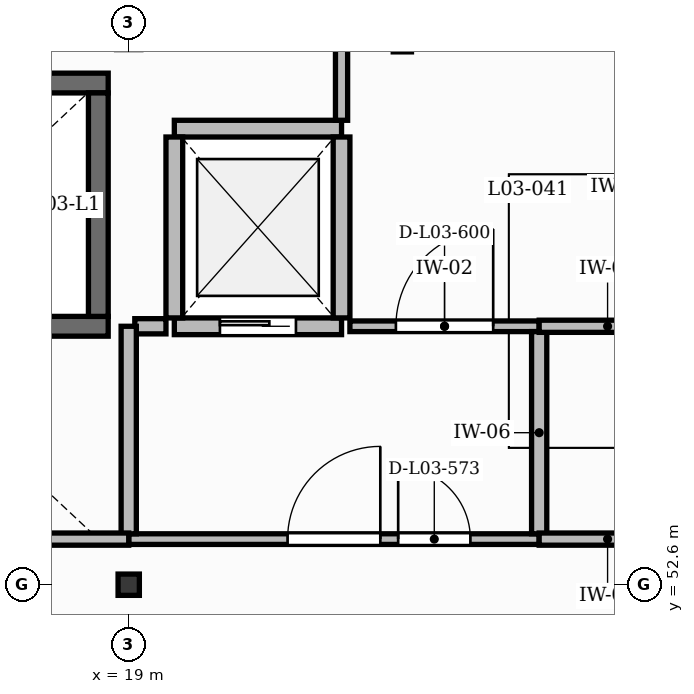
"""IFC4 building model, lengths in metres.
Left out: names, types, materials, properties, quantities, classifications, styles, units other than length and angle.
Written with IfcOpenShell. Run it as: python <this file> out.ifc"""

import sys

from ifc_helpers import new_model, si_unit, direction, frame, frame_2d, origin, origin_2d, place, context, subcontext, project, spatial, rectangle, extrude, element, fill, save


model = new_model("IFC4")
c1 = context("Model", 3, precision=1e-05, world=origin(), true_north=direction((0.0, 1.0)))
c2 = subcontext(c1, "Body", "Model", "MODEL_VIEW")
j1 = project(units=[si_unit("LENGTHUNIT", "METRE"), si_unit("PLANEANGLEUNIT", "RADIAN")], contexts=[c1])
p1 = place(None, origin())
s1 = spatial("IfcSite", under=j1, at=p1, CompositionType="ELEMENT")
p2 = place(p1, origin())
s2 = spatial("IfcBuilding", under=s1, at=p2, CompositionType="ELEMENT")
p3 = place(p2, frame((0.0, 0.0, 13.2)))
s3 = spatial("IfcBuildingStorey", under=s2, at=p3, CompositionType="ELEMENT", Elevation=13.2)
p4 = place(p3, frame((19.0, 52.6, 0.0), z_axis=(0.0, 0.0, 1.0), x_axis=(1.0, 0.0, 0.0)))
e1 = element("IfcColumn", 1, at=p4, inside=s3, PredefinedType="COLUMN", context=c2, shape_type="SweptSolid", body=[
    extrude(rectangle(XDim=0.28, YDim=0.28, at=origin_2d()), origin(), (0.0, 0.0, 1.0), 4.01),
])
for number, where, z_axis, x_axis in (
    (2, (12.07, 56.0, 0.0), (0.0, 0.0, 1.0), (1.0, 0.0, 0.0)),
    (3, (12.07, 59.2, 0.0), (0.0, 0.0, 1.0), (1.0, 0.0, 0.0)),
):
    element("IfcWall", number, at=place(p3, frame(where, z_axis=z_axis, x_axis=x_axis)), inside=s3, PredefinedType="SHEAR", context=c2, shape_type="SweptSolid", body=[
        extrude(rectangle(XDim=6.66, YDim=0.26, at=frame_2d((3.33, 0.0))), origin(), (0.0, 0.0, 1.0), 3.95),
    ])
p5 = place(p3, frame((18.6, 56.13, 0.0), z_axis=(0.0, 0.0, 1.0), x_axis=(0.0, 1.0, 0.0)))
e4 = element("IfcWall", 4, at=p5, inside=s3, PredefinedType="SHEAR", context=c2, shape_type="SweptSolid", body=[
    extrude(rectangle(XDim=2.94, YDim=0.26, at=frame_2d((1.47, 0.0))), origin(), (0.0, 0.0, 1.0), 3.95),
])
p6 = place(p3, frame((19.6, 56.0, 0.0), z_axis=(0.0, 0.0, 1.0), x_axis=(1.0, 0.0, 0.0)))
e5 = element("IfcWall", 5, at=p6, inside=s3, PredefinedType="SOLIDWALL", context=c2, shape_type="SweptSolid", body=[
    extrude(rectangle(XDim=2.2, YDim=0.22, at=frame_2d((1.1, 0.0))), origin(), (0.0, 0.0, 1.0), 3.95),
])
p7 = place(p6, frame((0.6, 0.0, 0.0)))
e6 = element("IfcOpeningElement", 6, at=p7, cuts=e5, PredefinedType="OPENING", context=c2, shape_type="SweptSolid", body=[
    extrude(rectangle(XDim=1.0, YDim=2.15, at=frame_2d((0.5, 1.075))), frame((0.0, 0.12, 0.0), z_axis=(0.0, -1.0, 0.0), x_axis=(1.0, 0.0, 0.0)), (0.0, 0.0, 1.0), 0.24),
])
p8 = place(p3, frame((19.6, 58.6, 0.0), z_axis=(0.0, 0.0, 1.0), x_axis=(1.0, 0.0, 0.0)))
e7 = element("IfcWall", 7, at=p8, inside=s3, PredefinedType="SOLIDWALL", context=c2, shape_type="SweptSolid", body=[
    extrude(rectangle(XDim=2.2, YDim=0.22, at=frame_2d((1.1, 0.0))), origin(), (0.0, 0.0, 1.0), 3.95),
])
for number, where, z_axis, x_axis in (
    (8, (19.6, 56.11, 0.0), (0.0, 0.0, 1.0), (0.0, 1.0, 0.0)),
    (9, (21.8, 56.11, 0.0), (0.0, 0.0, 1.0), (0.0, 1.0, 0.0)),
):
    element("IfcWall", number, at=place(p3, frame(where, z_axis=z_axis, x_axis=x_axis)), inside=s3, PredefinedType="SOLIDWALL", context=c2, shape_type="SweptSolid", body=[
        extrude(rectangle(XDim=2.38, YDim=0.22, at=frame_2d((1.19, 0.0))), origin(), (0.0, 0.0, 1.0), 3.95),
    ])
p9 = place(p3, frame((19.0, 53.2, 0.0), z_axis=(0.0, 0.0, 1.0), x_axis=(1.0, 0.0, 0.0)))
e10 = element("IfcWall", 10, at=p9, inside=s3, PredefinedType="PARTITIONING", context=c2, shape_type="SweptSolid", body=[
    extrude(rectangle(XDim=5.4, YDim=0.14, at=frame_2d((2.7, 0.0))), origin(), (0.0, 0.0, 1.0), 3.96),
])
p10 = place(p9, frame((2.09, 0.0, 0.0)))
e11 = element("IfcOpeningElement", 11, at=p10, cuts=e10, PredefinedType="OPENING", context=c2, shape_type="SweptSolid", body=[
    extrude(rectangle(XDim=1.22, YDim=2.1, at=frame_2d((0.61, 1.05))), frame((0.0, 0.08, 0.0), z_axis=(0.0, -1.0, 0.0), x_axis=(1.0, 0.0, 0.0)), (0.0, 0.0, 1.0), 0.16),
])
p11 = place(p9, frame((3.545, 0.0, 0.0)))
e12 = element("IfcOpeningElement", 12, at=p11, cuts=e10, PredefinedType="OPENING", context=c2, shape_type="SweptSolid", body=[
    extrude(rectangle(XDim=0.95, YDim=2.1, at=frame_2d((0.475, 1.05))), frame((0.0, 0.08, 0.0), z_axis=(0.0, -1.0, 0.0), x_axis=(1.0, 0.0, 0.0)), (0.0, 0.0, 1.0), 0.16),
])
p12 = place(p3, frame((21.91, 56.0, 0.0), z_axis=(0.0, 0.0, 1.0), x_axis=(1.0, 0.0, 0.0)))
e13 = element("IfcWall", 13, at=p12, inside=s3, PredefinedType="PARTITIONING", context=c2, shape_type="SweptSolid", body=[
    extrude(rectangle(XDim=2.49, YDim=0.14, at=frame_2d((1.245, 0.0))), origin(), (0.0, 0.0, 1.0), 3.96),
])
p13 = place(p12, frame((0.605, 0.0, 0.0)))
e14 = element("IfcOpeningElement", 14, at=p13, cuts=e13, PredefinedType="OPENING", context=c2, shape_type="SweptSolid", body=[
    extrude(rectangle(XDim=1.28, YDim=2.2, at=frame_2d((0.64, 1.1))), frame((0.0, 0.08, 0.0), z_axis=(0.0, -1.0, 0.0), x_axis=(1.0, 0.0, 0.0)), (0.0, 0.0, 1.0), 0.16),
])
p14 = place(p3, frame((24.4, 53.27, 0.0), z_axis=(0.0, 0.0, 1.0), x_axis=(0.0, 1.0, 0.0)))
e15 = element("IfcWall", 15, at=p14, inside=s3, PredefinedType="PARTITIONING", context=c2, shape_type="SweptSolid", body=[
    extrude(rectangle(XDim=2.66, YDim=0.2, at=frame_2d((1.33, 0.0))), origin(), (0.0, 0.0, 1.0), 3.96),
])
p15 = place(p3, frame((19.49, 56.0, 0.0), z_axis=(0.0, 0.0, 1.0), x_axis=(-1.0, 0.0, 0.0)))
e16 = element("IfcWall", 16, at=p15, inside=s3, PredefinedType="PARTITIONING", context=c2, shape_type="SweptSolid", body=[
    extrude(rectangle(XDim=0.41, YDim=0.2, at=frame_2d((0.205, 0.0))), origin(), (0.0, 0.0, 1.0), 3.96),
])
p16 = place(p3, frame((19.0, 53.27, 0.0), z_axis=(0.0, 0.0, 1.0), x_axis=(0.0, 1.0, 0.0)))
e17 = element("IfcWall", 17, at=p16, inside=s3, PredefinedType="PARTITIONING", context=c2, shape_type="SweptSolid", body=[
    extrude(rectangle(XDim=2.73, YDim=0.2, at=frame_2d((1.365, 0.0))), origin(), (0.0, 0.0, 1.0), 3.49),
])
p17 = place(p3, frame((26.2, 53.2, 0.0), z_axis=(0.0, 0.0, 1.0), x_axis=(-1.0, 0.0, 0.0)))
e18 = element("IfcWall", 18, at=p17, inside=s3, PredefinedType="PARTITIONING", context=c2, shape_type="SweptSolid", body=[
    extrude(rectangle(XDim=1.8, YDim=0.16, at=frame_2d((0.9, 0.0))), origin(), (0.0, 0.0, 1.0), 3.96),
])
p18 = place(p3, frame((19.0, 53.2, 0.0), z_axis=(0.0, 0.0, 1.0), x_axis=(-1.0, 0.0, 0.0)))
e19 = element("IfcWall", 19, at=p18, inside=s3, PredefinedType="PARTITIONING", context=c2, shape_type="SweptSolid", body=[
    extrude(rectangle(XDim=2.8, YDim=0.16, at=frame_2d((1.4, 0.0))), origin(), (0.0, 0.0, 1.0), 3.96),
])
p19 = place(p3, frame((24.4, 56.0, 0.0), z_axis=(0.0, 0.0, 1.0), x_axis=(1.0, 0.0, 0.0)))
e20 = element("IfcWall", 20, at=p19, inside=s3, PredefinedType="PARTITIONING", context=c2, shape_type="SweptSolid", body=[
    extrude(rectangle(XDim=1.8, YDim=0.16, at=frame_2d((0.9, 0.0))), origin(), (0.0, 0.0, 1.0), 3.96),
])
p20 = place(p3, frame((21.8, 58.71, 0.0), z_axis=(0.0, 0.0, 1.0), x_axis=(0.0, 1.0, 0.0)))
e21 = element("IfcWall", 21, at=p20, inside=s3, PredefinedType="PARTITIONING", context=c2, shape_type="SweptSolid", body=[
    extrude(rectangle(XDim=1.09, YDim=0.16, at=frame_2d((0.545, 0.0))), origin(), (0.0, 0.0, 1.0), 3.96),
])
p21 = place(p7, origin())
e22 = element("IfcDoor", 22, at=p21, inside=s3, OperationType="SLIDING_TO_LEFT", PredefinedType="DOOR", context=c2, shape_type="SweptSolid", body=[
    extrude(rectangle(XDim=1.0, YDim=2.15, at=frame_2d((0.5, 1.075))), frame((0.0, 0.025, 0.0), z_axis=(0.0, -1.0, 0.0), x_axis=(1.0, 0.0, 0.0)), (0.0, 0.0, 1.0), 0.05),
])
fill(e6, e22)
p22 = place(p10, origin())
e23 = element("IfcDoor", 23, at=p22, inside=s3, OperationType="SINGLE_SWING_RIGHT", PredefinedType="DOOR", context=c2, shape_type="SweptSolid", body=[
    extrude(rectangle(XDim=1.22, YDim=2.1, at=frame_2d((0.61, 1.05))), frame((0.0, 0.025, 0.0), z_axis=(0.0, -1.0, 0.0), x_axis=(1.0, 0.0, 0.0)), (0.0, 0.0, 1.0), 0.05),
])
fill(e11, e23)
p23 = place(p11, origin())
e24 = element("IfcDoor", 24, at=p23, inside=s3, OperationType="SINGLE_SWING_LEFT", PredefinedType="DOOR", context=c2, shape_type="SweptSolid", body=[
    extrude(rectangle(XDim=0.95, YDim=2.1, at=frame_2d((0.475, 1.05))), frame((0.0, 0.025, 0.0), z_axis=(0.0, -1.0, 0.0), x_axis=(1.0, 0.0, 0.0)), (0.0, 0.0, 1.0), 0.05),
])
fill(e12, e24)
p24 = place(p13, origin())
e25 = element("IfcDoor", 25, at=p24, inside=s3, OperationType="SINGLE_SWING_RIGHT", PredefinedType="DOOR", context=c2, shape_type="SweptSolid", body=[
    extrude(rectangle(XDim=1.28, YDim=2.2, at=frame_2d((0.64, 1.1))), frame((0.0, 0.025, 0.0), z_axis=(0.0, -1.0, 0.0), x_axis=(1.0, 0.0, 0.0)), (0.0, 0.0, 1.0), 0.05),
])
fill(e14, e25)
save(model, sys.argv[1])
